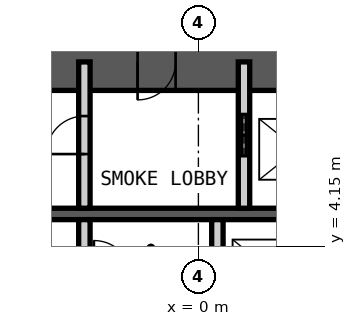
"""IFC4 building model, lengths in metres.
Left out: names, types, materials, properties, quantities, classifications, styles, units other than length and angle.
Written with IfcOpenShell. Run it as: python <this file> out.ifc"""

import sys

from ifc_helpers import new_model, si_unit, direction, frame, frame_2d, origin, place, context, subcontext, project, spatial, rectangle, extrude, element, fill, save


model = new_model("IFC4")
c1 = context("Model", 3, precision=1e-05, world=origin(), true_north=direction((0.0, 1.0)))
c2 = subcontext(c1, "Body", "Model", "MODEL_VIEW")
j1 = project(units=[si_unit("LENGTHUNIT", "METRE"), si_unit("PLANEANGLEUNIT", "RADIAN")], contexts=[c1])
p1 = place(None, origin())
s1 = spatial("IfcSite", under=j1, at=p1, CompositionType="ELEMENT")
p2 = place(p1, origin())
s2 = spatial("IfcBuilding", under=s1, at=p2, CompositionType="ELEMENT")
p3 = place(p2, frame((0.0, 0.0, 97.0)))
s3 = spatial("IfcBuildingStorey", under=s2, at=p3, CompositionType="ELEMENT", Elevation=97.0)
p4 = place(p3, frame((-12.0, 9.0, 0.0), z_axis=(0.0, 0.0, 1.0), x_axis=(1.0, 0.0, 0.0)))
e1 = element("IfcWall", 1, at=p4, inside=s3, PredefinedType="SHEAR", context=c2, shape_type="SweptSolid", body=[
    extrude(rectangle(XDim=24.0, YDim=1.5, at=frame_2d((12.0, 0.0))), origin(), (0.0, 0.0, 1.0), 6.0),
])
p5 = place(p4, frame((10.4, 0.0, 0.0)))
e2 = element("IfcOpeningElement", 2, at=p5, cuts=e1, PredefinedType="OPENING", context=c2, shape_type="SweptSolid", body=[
    extrude(rectangle(XDim=1.0, YDim=2.1, at=frame_2d((0.5, 1.05))), frame((0.0, 0.76, 0.0), z_axis=(0.0, -1.0, 0.0), x_axis=(1.0, 0.0, 0.0)), (0.0, 0.0, 1.0), 1.52),
])
p6 = place(p4, frame((17.6, 0.0, 0.0)))
e3 = element("IfcOpeningElement", 3, at=p6, cuts=e1, PredefinedType="OPENING", context=c2, shape_type="SweptSolid", body=[
    extrude(rectangle(XDim=0.9, YDim=2.1, at=frame_2d((0.45, 1.05))), frame((0.0, 0.76, 0.0), z_axis=(0.0, -1.0, 0.0), x_axis=(1.0, 0.0, 0.0)), (0.0, 0.0, 1.0), 1.52),
])
p7 = place(p4, frame((21.9, 0.0, 0.0)))
e4 = element("IfcOpeningElement", 4, at=p7, cuts=e1, PredefinedType="OPENING", context=c2, shape_type="SweptSolid", body=[
    extrude(rectangle(XDim=0.9, YDim=2.1, at=frame_2d((0.45, 1.05))), frame((0.0, 0.76, 0.0), z_axis=(0.0, -1.0, 0.0), x_axis=(1.0, 0.0, 0.0)), (0.0, 0.0, 1.0), 1.52),
])
p8 = place(p3, frame((-12.0, 5.0, 0.0), z_axis=(0.0, 0.0, 1.0), x_axis=(1.0, 0.0, 0.0)))
e5 = element("IfcWall", 5, at=p8, inside=s3, PredefinedType="SHEAR", context=c2, shape_type="SweptSolid", body=[
    extrude(rectangle(XDim=24.0, YDim=0.3, at=frame_2d((12.0, 0.0))), origin(), (0.0, 0.0, 1.0), 6.0),
])
p9 = place(p3, frame((-3.0, 5.15, 0.0), z_axis=(0.0, 0.0, 1.0), x_axis=(0.0, 1.0, 0.0)))
e6 = element("IfcWall", 6, at=p9, inside=s3, PredefinedType="PARTITIONING", context=c2, shape_type="SweptSolid", body=[
    extrude(rectangle(XDim=3.85, YDim=0.3, at=frame_2d((1.925, 0.0))), origin(), (0.0, 0.0, 1.0), 5.78),
])
p10 = place(p9, frame((1.425, 0.0, 0.0)))
e7 = element("IfcOpeningElement", 7, at=p10, cuts=e6, PredefinedType="OPENING", context=c2, shape_type="SweptSolid", body=[
    extrude(rectangle(XDim=1.0, YDim=2.1, at=frame_2d((0.5, 1.05))), frame((0.0, 0.16, 0.0), z_axis=(0.0, -1.0, 0.0), x_axis=(1.0, 0.0, 0.0)), (0.0, 0.0, 1.0), 0.32),
])
p11 = place(p3, frame((1.2, 5.15, 0.0), z_axis=(0.0, 0.0, 1.0), x_axis=(0.0, 1.0, 0.0)))
e8 = element("IfcWall", 8, at=p11, inside=s3, PredefinedType="PARTITIONING", context=c2, shape_type="SweptSolid", body=[
    extrude(rectangle(XDim=3.85, YDim=0.3, at=frame_2d((1.925, 0.0))), origin(), (0.0, 0.0, 1.0), 5.78),
])
p12 = place(p11, frame((1.375, 0.0, 0.0)))
e9 = element("IfcOpeningElement", 9, at=p12, cuts=e8, PredefinedType="OPENING", context=c2, shape_type="SweptSolid", body=[
    extrude(rectangle(XDim=1.1, YDim=2.4, at=frame_2d((0.55, 1.2))), frame((0.0, 0.16, 0.0), z_axis=(0.0, -1.0, 0.0), x_axis=(1.0, 0.0, 0.0)), (0.0, 0.0, 1.0), 0.32),
])
for number, where, z_axis, x_axis in (
    (10, (-3.0, 2.2, 0.0), (0.0, 0.0, 1.0), (0.0, 1.0, 0.0)),
    (11, (0.5, 2.2, 0.0), (0.0, 0.0, 1.0), (0.0, 1.0, 0.0)),
):
    element("IfcWall", number, at=place(p3, frame(where, z_axis=z_axis, x_axis=x_axis)), inside=s3, PredefinedType="PARTITIONING", context=c2, shape_type="SweptSolid", body=[
        extrude(rectangle(XDim=2.65, YDim=0.3, at=frame_2d((1.325, 0.0))), origin(), (0.0, 0.0, 1.0), 5.78),
    ])
p13 = place(p5, origin())
e12 = element("IfcDoor", 12, at=p13, inside=s3, OperationType="SINGLE_SWING_LEFT", PredefinedType="DOOR", context=c2, shape_type="SweptSolid", body=[
    extrude(rectangle(XDim=1.0, YDim=2.1, at=frame_2d((0.5, 1.05))), frame((0.0, 0.025, 0.0), z_axis=(0.0, -1.0, 0.0), x_axis=(1.0, 0.0, 0.0)), (0.0, 0.0, 1.0), 0.05),
])
fill(e2, e12)
p14 = place(p10, origin())
e13 = element("IfcDoor", 13, at=p14, inside=s3, OperationType="SINGLE_SWING_RIGHT", PredefinedType="DOOR", context=c2, shape_type="SweptSolid", body=[
    extrude(rectangle(XDim=1.0, YDim=2.1, at=frame_2d((0.5, 1.05))), frame((0.0, 0.025, 0.0), z_axis=(0.0, -1.0, 0.0), x_axis=(1.0, 0.0, 0.0)), (0.0, 0.0, 1.0), 0.05),
])
fill(e7, e13)
p15 = place(p12, origin())
e14 = element("IfcDoor", 14, at=p15, inside=s3, OperationType="DOUBLE_DOOR_SLIDING", PredefinedType="DOOR", context=c2, shape_type="SweptSolid", body=[
    extrude(rectangle(XDim=1.1, YDim=2.4, at=frame_2d((0.55, 1.2))), frame((0.0, 0.025, 0.0), z_axis=(0.0, -1.0, 0.0), x_axis=(1.0, 0.0, 0.0)), (0.0, 0.0, 1.0), 0.05),
])
fill(e9, e14)
save(model, sys.argv[1])
